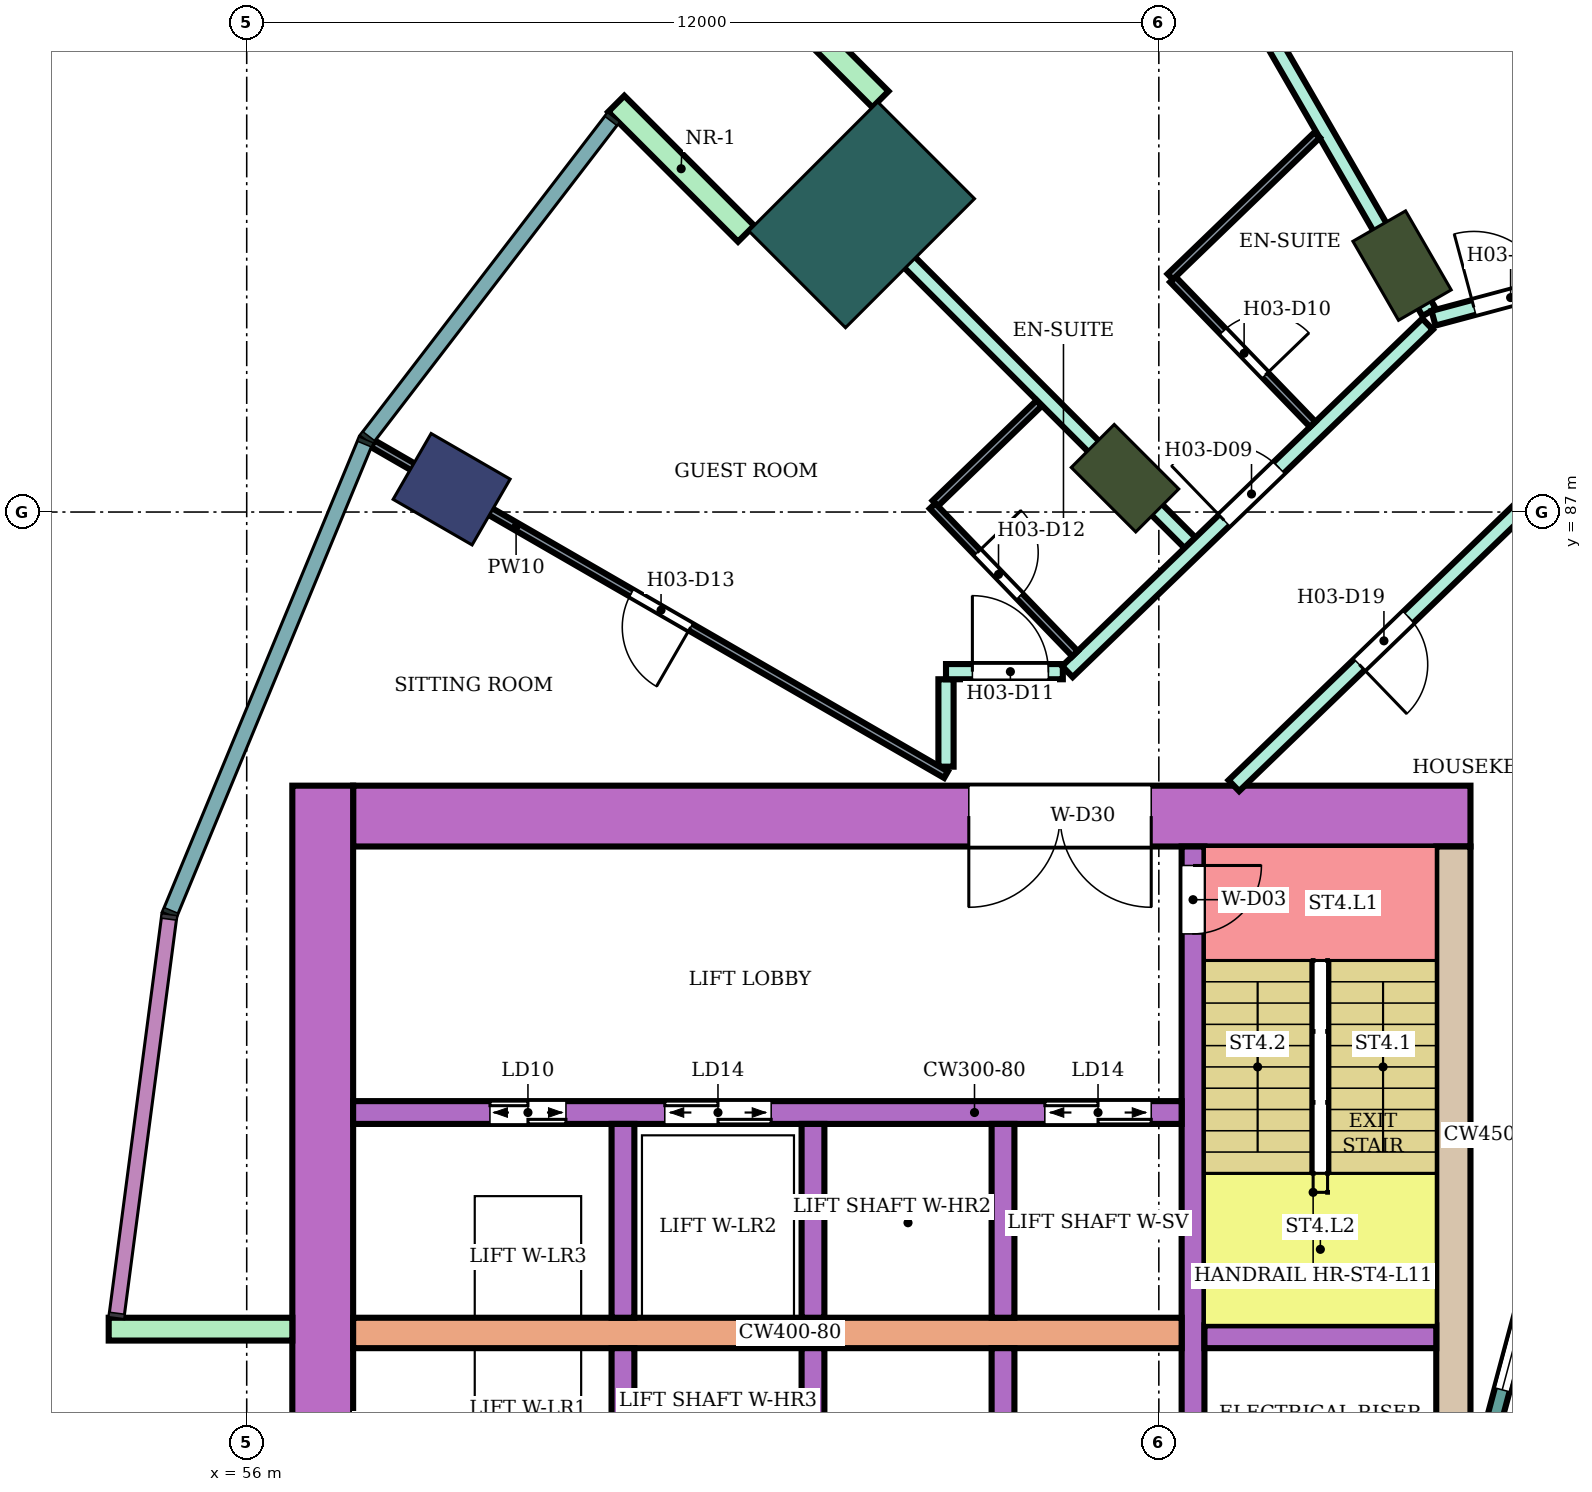
"""IFC4 building model, lengths in metres.
Left out: names, types, materials, properties, quantities, classifications, styles, units other than length and angle.
Written with IfcOpenShell. Run it as: python <this file> out.ifc"""

import sys

from ifc_helpers import new_model, si_unit, direction, frame, frame_2d, origin, origin_2d, place, context, subcontext, project, spatial, rectangle, extrude, element, fill, save


model = new_model("IFC4")
c1 = context("Model", 3, precision=1e-05, world=origin(), true_north=direction((0.0, 1.0)))
c2 = subcontext(c1, "Body", "Model", "MODEL_VIEW")
j1 = project(units=[si_unit("LENGTHUNIT", "METRE"), si_unit("PLANEANGLEUNIT", "RADIAN")], contexts=[c1])
p1 = place(None, origin())
s1 = spatial("IfcSite", under=j1, at=p1, CompositionType="ELEMENT")
p2 = place(p1, origin())
s2 = spatial("IfcBuilding", under=s1, at=p2, CompositionType="ELEMENT")
p3 = place(p2, frame((0.0, 0.0, 51.6)))
s3 = spatial("IfcBuildingStorey", under=s2, at=p3, CompositionType="ELEMENT", Elevation=51.6)
p4 = place(p3, frame((58.696, 87.3, 0.0), z_axis=(0.0, 0.0, 1.0), x_axis=(-0.866025403784, 0.5, 0.0)))
e1 = element("IfcColumn", 1, at=p4, inside=s3, PredefinedType="COLUMN", context=c2, shape_type="SweptSolid", body=[
    extrude(rectangle(XDim=1.2, YDim=1.0, at=origin_2d()), origin(), (0.0, 0.0, 1.0), 3.8),
])
for number, where, z_axis, x_axis in (
    (2, (71.2, 90.242, 0.0), (0.0, 0.0, 1.0), (-0.5, 0.866, 0.0)),
    (3, (67.555, 87.445, 0.0), (0.0, 0.0, 1.0), (-0.707, 0.707, 0.0)),
):
    element("IfcColumn", number, at=place(p3, frame(where, z_axis=z_axis, x_axis=x_axis)), inside=s3, PredefinedType="COLUMN", context=c2, shape_type="SweptSolid", body=[
        extrude(rectangle(XDim=1.2, YDim=0.8, at=origin_2d()), origin(), (0.0, 0.0, 1.0), 3.8),
    ])
p5 = place(p3, frame((64.09, 90.91, 0.0), z_axis=(0.0, 0.0, 1.0), x_axis=(-0.707106781187, 0.707106781187, 0.0)))
e4 = element("IfcColumn", 4, at=p5, inside=s3, PredefinedType="COLUMN", context=c2, shape_type="SweptSolid", body=[
    extrude(rectangle(XDim=1.8, YDim=2.4, at=origin_2d()), origin(), (0.0, 0.0, 1.0), 3.8),
])
p6 = place(p3, frame((72.1, 83.0, 0.0), z_axis=(0.0, 0.0, 1.0), x_axis=(-1.0, 0.0, 0.0)))
e5 = element("IfcWall", 5, at=p6, inside=s3, PredefinedType="SHEAR", context=c2, shape_type="SweptSolid", body=[
    extrude(rectangle(XDim=14.7, YDim=0.8, at=frame_2d((7.35, 0.0))), origin(), (0.0, 0.0, 1.0), 3.48),
])
p7 = place(p6, frame((4.2, 0.0, 0.0)))
e6 = element("IfcOpeningElement", 6, at=p7, cuts=e5, PredefinedType="OPENING", context=c2, shape_type="SweptSolid", body=[
    extrude(rectangle(XDim=2.4, YDim=2.4, at=frame_2d((1.2, 1.2))), frame((0.0, 0.41, 0.0), z_axis=(0.0, -1.0, 0.0), x_axis=(1.0, 0.0, 0.0)), (0.0, 0.0, 1.0), 0.82),
])
p8 = place(p3, frame((71.875, 82.6, 0.0), z_axis=(0.0, 0.0, 1.0), x_axis=(0.0, -1.0, 0.0)))
e7 = element("IfcWall", 7, at=p8, inside=s3, PredefinedType="SHEAR", context=c2, shape_type="SweptSolid", body=[
    extrude(rectangle(XDim=7.6, YDim=0.45, at=frame_2d((3.8, 0.0))), origin(), (0.0, 0.0, 1.0), 3.48),
])
p9 = place(p3, frame((57.0, 83.4, 0.0), z_axis=(0.0, 0.0, 1.0), x_axis=(0.0, -1.0, 0.0)))
e8 = element("IfcWall", 8, at=p9, inside=s3, PredefinedType="SHEAR", context=c2, shape_type="SweptSolid", body=[
    extrude(rectangle(XDim=16.8, YDim=0.8, at=frame_2d((8.4, 0.0))), origin(), (0.0, 0.0, 1.0), 3.48),
])
p10 = place(p3, frame((68.45, 82.6, 0.0), z_axis=(0.0, 0.0, 1.0), x_axis=(0.0, -1.0, 0.0)))
e9 = element("IfcWall", 9, at=p10, inside=s3, PredefinedType="SHEAR", context=c2, shape_type="SweptSolid", body=[
    extrude(rectangle(XDim=7.6, YDim=0.3, at=frame_2d((3.8, 0.0))), origin(), (0.0, 0.0, 1.0), 3.48),
])
p11 = place(p10, frame((0.25, 0.0, 0.0)))
e10 = element("IfcOpeningElement", 10, at=p11, cuts=e9, PredefinedType="OPENING", context=c2, shape_type="SweptSolid", body=[
    extrude(rectangle(XDim=0.9, YDim=2.1, at=frame_2d((0.45, 1.05))), frame((0.0, 0.16, 0.0), z_axis=(0.0, -1.0, 0.0), x_axis=(1.0, 0.0, 0.0)), (0.0, 0.0, 1.0), 0.32),
])
p12 = place(p3, frame((71.65, 76.15, 0.0), z_axis=(0.0, 0.0, 1.0), x_axis=(-1.0, 0.0, 0.0)))
e11 = element("IfcWall", 11, at=p12, inside=s3, PredefinedType="SHEAR", context=c2, shape_type="SweptSolid", body=[
    extrude(rectangle(XDim=3.05, YDim=0.3, at=frame_2d((1.525, 0.0))), origin(), (0.0, 0.0, 1.0), 3.48),
])
p13 = place(p3, frame((68.3, 76.2, 0.0), z_axis=(0.0, 0.0, 1.0), x_axis=(-1.0, 0.0, 0.0)))
e12 = element("IfcWall", 12, at=p13, inside=s3, PredefinedType="SHEAR", context=c2, shape_type="SweptSolid", body=[
    extrude(rectangle(XDim=10.9, YDim=0.4, at=frame_2d((5.45, 0.0))), origin(), (0.0, 0.0, 1.0), 3.48),
])
p14 = place(p3, frame((68.3, 79.1, 0.0), z_axis=(0.0, 0.0, 1.0), x_axis=(-1.0, 0.0, 0.0)))
e13 = element("IfcWall", 13, at=p14, inside=s3, PredefinedType="SHEAR", context=c2, shape_type="SweptSolid", body=[
    extrude(rectangle(XDim=10.9, YDim=0.3, at=frame_2d((5.45, 0.0))), origin(), (0.0, 0.0, 1.0), 3.48),
])
p15 = place(p14, frame((0.4, 0.0, 0.0)))
e14 = element("IfcOpeningElement", 14, at=p15, cuts=e13, PredefinedType="OPENING", context=c2, shape_type="SweptSolid", body=[
    extrude(rectangle(XDim=1.4, YDim=2.1, at=frame_2d((0.7, 1.05))), frame((0.0, 0.16, 0.0), z_axis=(0.0, -1.0, 0.0), x_axis=(1.0, 0.0, 0.0)), (0.0, 0.0, 1.0), 0.32),
])
p16 = place(p14, frame((5.4, 0.0, 0.0)))
e15 = element("IfcOpeningElement", 15, at=p16, cuts=e13, PredefinedType="OPENING", context=c2, shape_type="SweptSolid", body=[
    extrude(rectangle(XDim=1.4, YDim=2.1, at=frame_2d((0.7, 1.05))), frame((0.0, 0.16, 0.0), z_axis=(0.0, -1.0, 0.0), x_axis=(1.0, 0.0, 0.0)), (0.0, 0.0, 1.0), 0.32),
])
p17 = place(p14, frame((8.1, 0.0, 0.0)))
e16 = element("IfcOpeningElement", 16, at=p17, cuts=e13, PredefinedType="OPENING", context=c2, shape_type="SweptSolid", body=[
    extrude(rectangle(XDim=1.0, YDim=2.1, at=frame_2d((0.5, 1.05))), frame((0.0, 0.16, 0.0), z_axis=(0.0, -1.0, 0.0), x_axis=(1.0, 0.0, 0.0)), (0.0, 0.0, 1.0), 0.32),
])
for number, where, z_axis, x_axis in (
    (17, (65.95, 76.0, 0.0), (0.0, 0.0, 1.0), (0.0, -1.0, 0.0)),
    (18, (63.45, 76.0, 0.0), (0.0, 0.0, 1.0), (0.0, -1.0, 0.0)),
    (19, (60.95, 76.0, 0.0), (0.0, 0.0, 1.0), (0.0, -1.0, 0.0)),
    (20, (65.95, 78.95, 0.0), (0.0, 0.0, 1.0), (0.0, -1.0, 0.0)),
    (21, (63.45, 78.95, 0.0), (0.0, 0.0, 1.0), (0.0, -1.0, 0.0)),
    (22, (60.95, 78.95, 0.0), (0.0, 0.0, 1.0), (0.0, -1.0, 0.0)),
):
    element("IfcWall", number, at=place(p3, frame(where, z_axis=z_axis, x_axis=x_axis)), inside=s3, PredefinedType="SHEAR", context=c2, shape_type="SweptSolid", body=[
        extrude(rectangle(XDim=2.55, YDim=0.3, at=frame_2d((1.275, 0.0))), origin(), (0.0, 0.0, 1.0), 3.48),
    ])
for number, where, z_axis, x_axis in (
    (23, (64.338, 92.43, 0.0), (0.0, 0.0, 1.0), (-0.707, 0.707, 0.0)),
    (24, (62.57, 90.662, 0.0), (0.0, 0.0, 1.0), (-0.707, 0.707, 0.0)),
    (25, (56.6, 76.25, 0.0), (0.0, 0.0, 1.0), (-1.0, 0.0, 0.0)),
):
    element("IfcWall", number, at=place(p3, frame(where, z_axis=z_axis, x_axis=x_axis)), inside=s3, PredefinedType="NOTDEFINED", context=c2, shape_type="SweptSolid", body=[
        extrude(rectangle(XDim=2.416, YDim=0.3, at=frame_2d((1.208, 0.0))), origin(), (0.0, 0.0, 1.0), 3.8),
    ])
p18 = place(p3, frame((73.415, 78.802, 0.0), z_axis=(0.0, 0.0, 1.0), x_axis=(-0.258789828301, -0.965933654434, 0.0)))
e26 = element("IfcWall", 26, at=p18, inside=s3, PredefinedType="NOTDEFINED", context=c2, shape_type="SweptSolid", body=[
    extrude(rectangle(XDim=3.936, YDim=0.2, at=frame_2d((1.968, 0.0))), origin(), (0.0, 0.0, 1.0), 3.8),
])
p19 = place(p18, frame((0.468, 0.0, 0.9)))
e27 = element("IfcOpeningElement", 27, at=p19, cuts=e26, PredefinedType="OPENING", context=c2, shape_type="SweptSolid", body=[
    extrude(rectangle(XDim=3.0, YDim=2.3, at=frame_2d((1.5, 1.15))), frame((0.0, 0.11, 0.0), z_axis=(0.0, -1.0, 0.0), x_axis=(1.0, 0.0, 0.0)), (0.0, 0.0, 1.0), 0.22),
])
p20 = place(p3, frame((63.598, 91.408, 0.0), z_axis=(0.0, 0.0, 1.0), x_axis=(0.706999146394, -0.707214399597, 0.0)))
e28 = element("IfcWall", 28, at=p20, inside=s3, PredefinedType="PARTITIONING", context=c2, shape_type="SweptSolid", body=[
    extrude(rectangle(XDim=6.805, YDim=0.2, at=frame_2d((3.403, 0.0))), origin(), (0.0, 0.0, 1.0), 3.35),
])
p21 = place(p3, frame((65.2, 83.65, 0.0), z_axis=(0.0, 0.0, 1.0), x_axis=(0.0, 1.0, 0.0)))
e29 = element("IfcWall", 29, at=p21, inside=s3, PredefinedType="PARTITIONING", context=c2, shape_type="SweptSolid", body=[
    extrude(rectangle(XDim=1.15, YDim=0.2, at=frame_2d((0.575, 0.0))), origin(), (0.0, 0.0, 1.0), 3.35),
])
p22 = place(p3, frame((65.2, 84.9, 0.0), z_axis=(0.0, 0.0, 1.0), x_axis=(1.0, 0.0, 0.0)))
e30 = element("IfcWall", 30, at=p22, inside=s3, PredefinedType="PARTITIONING", context=c2, shape_type="SweptSolid", body=[
    extrude(rectangle(XDim=1.537, YDim=0.2, at=frame_2d((0.769, 0.0))), origin(), (0.0, 0.0, 1.0), 3.35),
])
p23 = place(p22, frame((0.347, 0.0, 0.0)))
e31 = element("IfcOpeningElement", 31, at=p23, cuts=e30, PredefinedType="OPENING", context=c2, shape_type="SweptSolid", body=[
    extrude(rectangle(XDim=1.0, YDim=2.1, at=frame_2d((0.5, 1.05))), frame((0.0, 0.11, 0.0), z_axis=(0.0, -1.0, 0.0), x_axis=(1.0, 0.0, 0.0)), (0.0, 0.0, 1.0), 0.22),
])
p24 = place(p3, frame((66.797, 84.9, 0.0), z_axis=(0.0, 0.0, 1.0), x_axis=(0.719692092412, 0.694293376116, 0.0)))
e32 = element("IfcWall", 32, at=p24, inside=s3, PredefinedType="PARTITIONING", context=c2, shape_type="SweptSolid", body=[
    extrude(rectangle(XDim=6.584, YDim=0.2, at=frame_2d((3.292, 0.0))), origin(), (0.0, 0.0, 1.0), 3.35),
])
p25 = place(p24, frame((2.866, 0.0, 0.0)))
e33 = element("IfcOpeningElement", 33, at=p25, cuts=e32, PredefinedType="OPENING", context=c2, shape_type="SweptSolid", body=[
    extrude(rectangle(XDim=1.0, YDim=2.1, at=frame_2d((0.5, 1.05))), frame((0.0, 0.11, 0.0), z_axis=(0.0, -1.0, 0.0), x_axis=(1.0, 0.0, 0.0)), (0.0, 0.0, 1.0), 0.22),
])
p26 = place(p3, frame((67.103, 97.342, 0.0), z_axis=(0.0, 0.0, 1.0), x_axis=(0.499906738326, -0.866079241742, 0.0)))
e34 = element("IfcWall", 34, at=p26, inside=s3, PredefinedType="PARTITIONING", context=c2, shape_type="SweptSolid", body=[
    extrude(rectangle(XDim=8.907, YDim=0.2, at=frame_2d((4.454, 0.0))), origin(), (0.0, 0.0, 1.0), 3.35),
])
p27 = place(p3, frame((68.987, 83.4, 0.0), z_axis=(0.0, 0.0, 1.0), x_axis=(0.719547721855, 0.694442996922, 0.0)))
e35 = element("IfcWall", 35, at=p27, inside=s3, PredefinedType="PARTITIONING", context=c2, shape_type="SweptSolid", body=[
    extrude(rectangle(XDim=5.378, YDim=0.2, at=frame_2d((2.689, 0.0))), origin(), (0.0, 0.0, 1.0), 3.35),
])
p28 = place(p27, frame((2.294, 0.0, 0.0)))
e36 = element("IfcOpeningElement", 36, at=p28, cuts=e35, PredefinedType="OPENING", context=c2, shape_type="SweptSolid", body=[
    extrude(rectangle(XDim=0.9, YDim=2.1, at=frame_2d((0.45, 1.05))), frame((0.0, 0.11, 0.0), z_axis=(0.0, -1.0, 0.0), x_axis=(1.0, 0.0, 0.0)), (0.0, 0.0, 1.0), 0.22),
])
p29 = place(p3, frame((71.614, 89.55, 0.0), z_axis=(0.0, 0.0, 1.0), x_axis=(0.965967958589, 0.258661753994, 0.0)))
e37 = element("IfcWall", 37, at=p29, inside=s3, PredefinedType="PARTITIONING", context=c2, shape_type="SweptSolid", body=[
    extrude(rectangle(XDim=8.592, YDim=0.2, at=frame_2d((4.296, 0.0))), origin(), (0.0, 0.0, 1.0), 3.35),
])
p30 = place(p29, frame((0.55, 0.0, 0.0)))
e38 = element("IfcOpeningElement", 38, at=p30, cuts=e37, PredefinedType="OPENING", context=c2, shape_type="SweptSolid", body=[
    extrude(rectangle(XDim=1.0, YDim=2.1, at=frame_2d((0.5, 1.05))), frame((0.0, 0.11, 0.0), z_axis=(0.0, -1.0, 0.0), x_axis=(1.0, 0.0, 0.0)), (0.0, 0.0, 1.0), 0.22),
])
p31 = place(p3, frame((57.659, 87.899, 0.0), z_axis=(0.0, 0.0, 1.0), x_axis=(0.86602264145, -0.500004784474, 0.0)))
e39 = element("IfcWall", 39, at=p31, inside=s3, PredefinedType="PARTITIONING", context=c2, shape_type="SweptSolid", body=[
    extrude(rectangle(XDim=8.708, YDim=0.1, at=frame_2d((4.354, 0.0))), origin(), (0.0, 0.0, 1.0), 3.35),
])
p32 = place(p31, frame((3.929, 0.0, 0.0)))
e40 = element("IfcOpeningElement", 40, at=p32, cuts=e39, PredefinedType="OPENING", context=c2, shape_type="SweptSolid", body=[
    extrude(rectangle(XDim=0.9, YDim=2.1, at=frame_2d((0.45, 1.05))), frame((0.0, 0.06, 0.0), z_axis=(0.0, -1.0, 0.0), x_axis=(1.0, 0.0, 0.0)), (0.0, 0.0, 1.0), 0.12),
])
p33 = place(p3, frame((65.059, 87.114, 0.0), z_axis=(0.0, 0.0, 1.0), x_axis=(0.719715847356, 0.694268751324, 0.0)))
e41 = element("IfcWall", 41, at=p33, inside=s3, PredefinedType="PARTITIONING", context=c2, shape_type="SweptSolid", body=[
    extrude(rectangle(XDim=1.9, YDim=0.1, at=frame_2d((0.95, 0.0))), origin(), (0.0, 0.0, 1.0), 3.35),
])
p34 = place(p3, frame((65.023, 87.079, 0.0), z_axis=(0.0, 0.0, 1.0), x_axis=(0.694287838235, -0.719697434815, 0.0)))
e42 = element("IfcWall", 42, at=p34, inside=s3, PredefinedType="PARTITIONING", context=c2, shape_type="SweptSolid", body=[
    extrude(rectangle(XDim=2.7, YDim=0.1, at=frame_2d((1.35, 0.0))), origin(), (0.0, 0.0, 1.0), 3.35),
])
p35 = place(p34, frame((0.85, 0.0, 0.0)))
e43 = element("IfcOpeningElement", 43, at=p35, cuts=e42, PredefinedType="OPENING", context=c2, shape_type="SweptSolid", body=[
    extrude(rectangle(XDim=0.8, YDim=2.1, at=frame_2d((0.4, 1.05))), frame((0.0, 0.06, 0.0), z_axis=(0.0, -1.0, 0.0), x_axis=(1.0, 0.0, 0.0)), (0.0, 0.0, 1.0), 0.12),
])
p36 = place(p3, frame((68.185, 90.06, 0.0), z_axis=(0.0, 0.0, 1.0), x_axis=(0.69446127412, -0.719530081892, 0.0)))
e44 = element("IfcWall", 44, at=p36, inside=s3, PredefinedType="PARTITIONING", context=c2, shape_type="SweptSolid", body=[
    extrude(rectangle(XDim=2.649, YDim=0.1, at=frame_2d((1.324, 0.0))), origin(), (0.0, 0.0, 1.0), 3.35),
])
p37 = place(p36, frame((0.95, 0.0, 0.0)))
e45 = element("IfcOpeningElement", 45, at=p37, cuts=e44, PredefinedType="OPENING", context=c2, shape_type="SweptSolid", body=[
    extrude(rectangle(XDim=0.8, YDim=2.1, at=frame_2d((0.4, 1.05))), frame((0.0, 0.06, 0.0), z_axis=(0.0, -1.0, 0.0), x_axis=(1.0, 0.0, 0.0)), (0.0, 0.0, 1.0), 0.12),
])
p38 = place(p3, frame((68.15, 90.096, 0.0), z_axis=(0.0, 0.0, 1.0), x_axis=(0.719667544954, 0.694318820672, 0.0)))
e46 = element("IfcWall", 46, at=p38, inside=s3, PredefinedType="PARTITIONING", context=c2, shape_type="SweptSolid", body=[
    extrude(rectangle(XDim=2.687, YDim=0.1, at=frame_2d((1.344, 0.0))), origin(), (0.0, 0.0, 1.0), 3.35),
])
p39 = place(p19, origin())
e47 = element("IfcWindow", 47, at=p39, inside=s3, PartitioningType="SINGLE_PANEL", PredefinedType="WINDOW", context=c2, shape_type="SweptSolid", body=[
    extrude(rectangle(XDim=3.0, YDim=2.3, at=frame_2d((1.5, 1.15))), frame((0.0, 0.03, 0.0), z_axis=(0.0, -1.0, 0.0), x_axis=(1.0, 0.0, 0.0)), (0.0, 0.0, 1.0), 0.06),
])
fill(e27, e47)
p40 = place(p30, origin())
e48 = element("IfcDoor", 48, at=p40, inside=s3, OperationType="SINGLE_SWING_LEFT", PredefinedType="DOOR", context=c2, shape_type="SweptSolid", body=[
    extrude(rectangle(XDim=1.0, YDim=2.1, at=frame_2d((0.5, 1.05))), frame((0.0, 0.025, 0.0), z_axis=(0.0, -1.0, 0.0), x_axis=(1.0, 0.0, 0.0)), (0.0, 0.0, 1.0), 0.05),
])
fill(e38, e48)
p41 = place(p25, origin())
e49 = element("IfcDoor", 49, at=p41, inside=s3, OperationType="SINGLE_SWING_LEFT", PredefinedType="DOOR", context=c2, shape_type="SweptSolid", body=[
    extrude(rectangle(XDim=1.0, YDim=2.1, at=frame_2d((0.5, 1.05))), frame((0.0, 0.025, 0.0), z_axis=(0.0, -1.0, 0.0), x_axis=(1.0, 0.0, 0.0)), (0.0, 0.0, 1.0), 0.05),
])
fill(e33, e49)
p42 = place(p37, origin())
e50 = element("IfcDoor", 50, at=p42, inside=s3, OperationType="SINGLE_SWING_RIGHT", PredefinedType="DOOR", context=c2, shape_type="SweptSolid", body=[
    extrude(rectangle(XDim=0.8, YDim=2.1, at=frame_2d((0.4, 1.05))), frame((0.0, 0.025, 0.0), z_axis=(0.0, -1.0, 0.0), x_axis=(1.0, 0.0, 0.0)), (0.0, 0.0, 1.0), 0.05),
])
fill(e45, e50)
p43 = place(p23, origin())
e51 = element("IfcDoor", 51, at=p43, inside=s3, OperationType="SINGLE_SWING_LEFT", PredefinedType="DOOR", context=c2, shape_type="SweptSolid", body=[
    extrude(rectangle(XDim=1.0, YDim=2.1, at=frame_2d((0.5, 1.05))), frame((0.0, 0.025, 0.0), z_axis=(0.0, -1.0, 0.0), x_axis=(1.0, 0.0, 0.0)), (0.0, 0.0, 1.0), 0.05),
])
fill(e31, e51)
p44 = place(p35, origin())
e52 = element("IfcDoor", 52, at=p44, inside=s3, OperationType="SINGLE_SWING_LEFT", PredefinedType="DOOR", context=c2, shape_type="SweptSolid", body=[
    extrude(rectangle(XDim=0.8, YDim=2.1, at=frame_2d((0.4, 1.05))), frame((0.0, 0.025, 0.0), z_axis=(0.0, -1.0, 0.0), x_axis=(1.0, 0.0, 0.0)), (0.0, 0.0, 1.0), 0.05),
])
fill(e43, e52)
p45 = place(p32, frame((0.9, 0.0, 0.0), z_axis=(0.0, 0.0, 1.0), x_axis=(-1.0, 0.0, 0.0)))
e53 = element("IfcDoor", 53, at=p45, inside=s3, OperationType="SINGLE_SWING_LEFT", PredefinedType="DOOR", context=c2, shape_type="SweptSolid", body=[
    extrude(rectangle(XDim=0.9, YDim=2.1, at=frame_2d((0.45, 1.05))), frame((0.0, 0.025, 0.0), z_axis=(0.0, -1.0, 0.0), x_axis=(1.0, 0.0, 0.0)), (0.0, 0.0, 1.0), 0.05),
])
fill(e40, e53)
p46 = place(p28, frame((0.9, 0.0, 0.0), z_axis=(0.0, 0.0, 1.0), x_axis=(-1.0, 0.0, 0.0)))
e54 = element("IfcDoor", 54, at=p46, inside=s3, OperationType="SINGLE_SWING_RIGHT", PredefinedType="DOOR", context=c2, shape_type="SweptSolid", body=[
    extrude(rectangle(XDim=0.9, YDim=2.1, at=frame_2d((0.45, 1.05))), frame((0.0, 0.025, 0.0), z_axis=(0.0, -1.0, 0.0), x_axis=(1.0, 0.0, 0.0)), (0.0, 0.0, 1.0), 0.05),
])
fill(e36, e54)
p47 = place(p11, origin())
e55 = element("IfcDoor", 55, at=p47, inside=s3, OperationType="SINGLE_SWING_LEFT", PredefinedType="DOOR", context=c2, shape_type="SweptSolid", body=[
    extrude(rectangle(XDim=0.9, YDim=2.1, at=frame_2d((0.45, 1.05))), frame((0.0, 0.025, 0.0), z_axis=(0.0, -1.0, 0.0), x_axis=(1.0, 0.0, 0.0)), (0.0, 0.0, 1.0), 0.05),
])
fill(e10, e55)
p48 = place(p15, origin())
e56 = element("IfcDoor", 56, at=p48, inside=s3, OperationType="DOUBLE_DOOR_SLIDING", PredefinedType="DOOR", context=c2, shape_type="SweptSolid", body=[
    extrude(rectangle(XDim=1.4, YDim=2.1, at=frame_2d((0.7, 1.05))), frame((0.0, 0.025, 0.0), z_axis=(0.0, -1.0, 0.0), x_axis=(1.0, 0.0, 0.0)), (0.0, 0.0, 1.0), 0.05),
])
fill(e14, e56)
p49 = place(p16, origin())
e57 = element("IfcDoor", 57, at=p49, inside=s3, OperationType="DOUBLE_DOOR_SLIDING", PredefinedType="DOOR", context=c2, shape_type="SweptSolid", body=[
    extrude(rectangle(XDim=1.4, YDim=2.1, at=frame_2d((0.7, 1.05))), frame((0.0, 0.025, 0.0), z_axis=(0.0, -1.0, 0.0), x_axis=(1.0, 0.0, 0.0)), (0.0, 0.0, 1.0), 0.05),
])
fill(e15, e57)
p50 = place(p17, origin())
e58 = element("IfcDoor", 58, at=p50, inside=s3, OperationType="DOUBLE_DOOR_SLIDING", PredefinedType="DOOR", context=c2, shape_type="SweptSolid", body=[
    extrude(rectangle(XDim=1.0, YDim=2.1, at=frame_2d((0.5, 1.05))), frame((0.0, 0.025, 0.0), z_axis=(0.0, -1.0, 0.0), x_axis=(1.0, 0.0, 0.0)), (0.0, 0.0, 1.0), 0.05),
])
fill(e16, e58)
p51 = place(p7, origin())
e59 = element("IfcDoor", 59, at=p51, inside=s3, OperationType="DOUBLE_DOOR_SINGLE_SWING", PredefinedType="DOOR", context=c2, shape_type="SweptSolid", body=[
    extrude(rectangle(XDim=2.4, YDim=2.4, at=frame_2d((1.2, 1.2))), frame((0.0, 0.025, 0.0), z_axis=(0.0, -1.0, 0.0), x_axis=(1.0, 0.0, 0.0)), (0.0, 0.0, 1.0), 0.05),
])
fill(e6, e59)
save(model, sys.argv[1])
